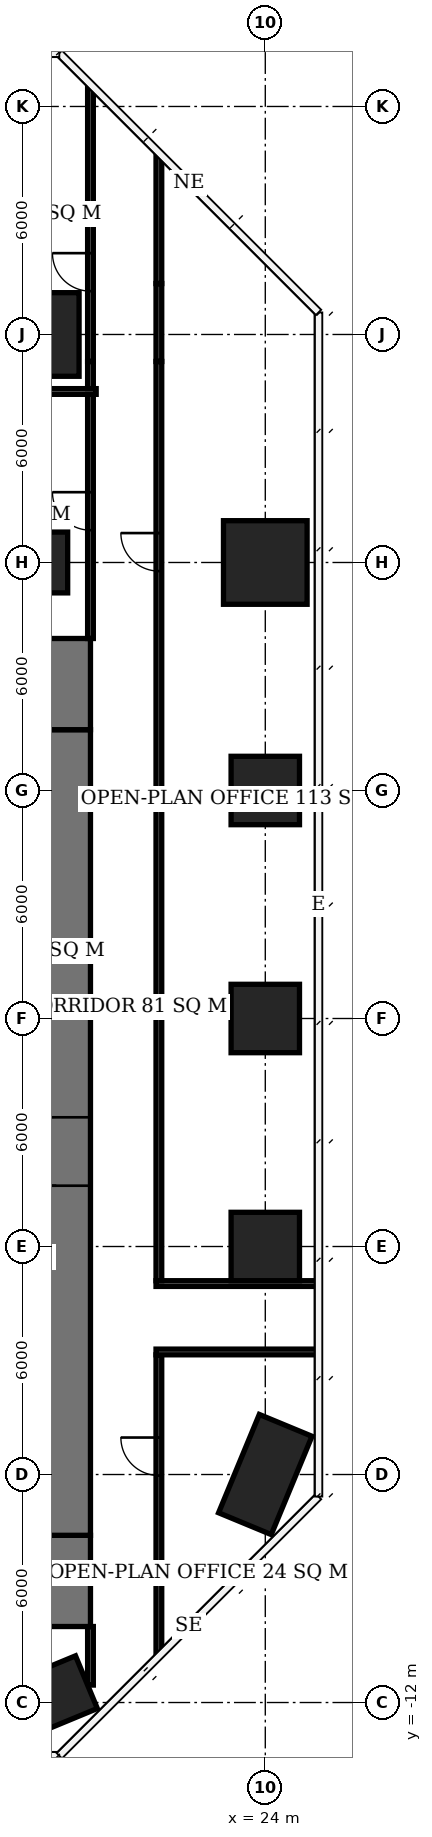
"""IFC4 building model, lengths in metres.
Left out: names, types, materials, properties, quantities, classifications, styles, units other than length and angle.
Written with IfcOpenShell. Run it as: python <this file> out.ifc"""

import sys

from ifc_helpers import new_model, si_unit, direction, frame, frame_2d, origin, origin_2d, place, context, subcontext, project, spatial, rectangle, extrude, element, fill, save


model = new_model("IFC4")
c1 = context("Model", 3, precision=1e-05, world=origin(), true_north=direction((0.0, 1.0)))
c2 = subcontext(c1, "Body", "Model", "MODEL_VIEW")
j1 = project(units=[si_unit("LENGTHUNIT", "METRE"), si_unit("PLANEANGLEUNIT", "RADIAN")], contexts=[c1])
p1 = place(None, origin())
s1 = spatial("IfcSite", under=j1, at=p1, CompositionType="ELEMENT")
p2 = place(p1, origin())
s2 = spatial("IfcBuilding", under=s1, at=p2, CompositionType="ELEMENT")
p3 = place(p2, frame((0.0, 0.0, 105.5)))
s3 = spatial("IfcBuildingStorey", under=s2, at=p3, CompositionType="ELEMENT", Elevation=105.5)
p4 = place(p3, frame((18.0, -12.0, 0.0), z_axis=(0.0, 0.0, 1.0), x_axis=(-0.923879532511, -0.382683432365, 0.0)))
e1 = element("IfcColumn", 1, at=p4, inside=s3, PredefinedType="COLUMN", context=c2, shape_type="SweptSolid", body=[
    extrude(rectangle(XDim=2.8, YDim=1.5, at=origin_2d()), origin(), (0.0, 0.0, 1.0), 3.9),
])
p5 = place(p3, frame((18.0, 18.0, 0.0), z_axis=(0.0, 0.0, 1.0), x_axis=(1.0, 0.0, 0.0)))
e2 = element("IfcColumn", 2, at=p5, inside=s3, PredefinedType="COLUMN", context=c2, shape_type="SweptSolid", body=[
    extrude(rectangle(XDim=1.6, YDim=1.6, at=origin_2d()), origin(), (0.0, 0.0, 1.0), 3.9),
])
p6 = place(p3, frame((18.0, 24.0, 0.0), z_axis=(0.0, 0.0, 1.0), x_axis=(1.0, 0.0, 0.0)))
e3 = element("IfcColumn", 3, at=p6, inside=s3, PredefinedType="COLUMN", context=c2, shape_type="SweptSolid", body=[
    extrude(rectangle(XDim=2.2, YDim=2.2, at=origin_2d()), origin(), (0.0, 0.0, 1.0), 3.9),
])
p7 = place(p3, frame((24.0, -6.0, 0.0), z_axis=(0.0, 0.0, 1.0), x_axis=(-0.382683432365, -0.923879532511, 0.0)))
e4 = element("IfcColumn", 4, at=p7, inside=s3, PredefinedType="COLUMN", context=c2, shape_type="SweptSolid", body=[
    extrude(rectangle(XDim=2.8, YDim=1.5, at=origin_2d()), origin(), (0.0, 0.0, 1.0), 3.9),
])
for number, where, z_axis, x_axis in (
    (5, (24.0, 0.0, 0.0), (0.0, 0.0, 1.0), (1.0, 0.0, 0.0)),
    (6, (24.0, 6.0, 0.0), (0.0, 0.0, 1.0), (1.0, 0.0, 0.0)),
    (7, (24.0, 12.0, 0.0), (0.0, 0.0, 1.0), (1.0, 0.0, 0.0)),
):
    element("IfcColumn", number, at=place(p3, frame(where, z_axis=z_axis, x_axis=x_axis)), inside=s3, PredefinedType="COLUMN", context=c2, shape_type="SweptSolid", body=[
        extrude(rectangle(XDim=1.8, YDim=1.8, at=origin_2d()), origin(), (0.0, 0.0, 1.0), 3.9),
    ])
p8 = place(p3, frame((24.0, 18.0, 0.0), z_axis=(0.0, 0.0, 1.0), x_axis=(1.0, 0.0, 0.0)))
e8 = element("IfcColumn", 8, at=p8, inside=s3, PredefinedType="COLUMN", context=c2, shape_type="SweptSolid", body=[
    extrude(rectangle(XDim=2.2, YDim=2.2, at=origin_2d()), origin(), (0.0, 0.0, 1.0), 3.9),
])
p9 = place(p3, frame((18.5, -7.6, 0.0), z_axis=(0.0, 0.0, 1.0), x_axis=(0.0, 1.0, 0.0)))
e9 = element("IfcWall", 9, at=p9, inside=s3, PredefinedType="SHEAR", context=c2, shape_type="SweptSolid", body=[
    extrude(rectangle(XDim=21.2, YDim=1.8, at=frame_2d((10.6, 0.0))), origin(), (0.0, 0.0, 1.0), 3.9),
])
p10 = place(p9, frame((9.2, 0.0, 0.0)))
e10 = element("IfcOpeningElement", 10, at=p10, cuts=e9, PredefinedType="OPENING", context=c2, shape_type="SweptSolid", body=[
    extrude(rectangle(XDim=1.8, YDim=2.4, at=frame_2d((0.9, 1.2))), frame((0.0, 0.91, 0.0), z_axis=(0.0, -1.0, 0.0), x_axis=(1.0, 0.0, 0.0)), (0.0, 0.0, 1.0), 1.82),
])
for number, where, z_axis, x_axis in (
    (11, (18.5, -10.0, 0.0), (0.0, 0.0, 1.0), (0.0, 1.0, 0.0)),
    (12, (18.5, 13.6, 0.0), (0.0, 0.0, 1.0), (0.0, 1.0, 0.0)),
):
    element("IfcWall", number, at=place(p3, frame(where, z_axis=z_axis, x_axis=x_axis)), inside=s3, PredefinedType="SHEAR", context=c2, shape_type="SweptSolid", body=[
        extrude(rectangle(XDim=2.4, YDim=1.8, at=frame_2d((1.2, 0.0))), origin(), (0.0, 0.0, 1.0), 3.9),
    ])
p11 = place(p3, frame((10.575, 22.5, 0.0), z_axis=(0.0, 0.0, 1.0), x_axis=(1.0, 0.0, 0.0)))
e13 = element("IfcWall", 13, at=p11, inside=s3, PredefinedType="PARTITIONING", context=c2, shape_type="SweptSolid", body=[
    extrude(rectangle(XDim=8.975, YDim=0.15, at=frame_2d((4.488, 0.0))), origin(), (0.0, 0.0, 1.0), 3.65),
])
p12 = place(p3, frame((19.4, -11.541, 0.0), z_axis=(0.0, 0.0, 1.0), x_axis=(0.0, 1.0, 0.0)))
e14 = element("IfcWall", 14, at=p12, inside=s3, PredefinedType="PARTITIONING", context=c2, shape_type="SweptSolid", body=[
    extrude(rectangle(XDim=1.541, YDim=0.15, at=frame_2d((0.77, 0.0))), origin(), (0.0, 0.0, 1.0), 3.65),
])
p13 = place(p3, frame((19.4, 16.0, 0.0), z_axis=(0.0, 0.0, 1.0), x_axis=(0.0, 1.0, 0.0)))
e15 = element("IfcWall", 15, at=p13, inside=s3, PredefinedType="PARTITIONING", context=c2, shape_type="SweptSolid", body=[
    extrude(rectangle(XDim=6.425, YDim=0.15, at=frame_2d((3.212, 0.0))), origin(), (0.0, 0.0, 1.0), 3.65),
])
p14 = place(p13, frame((2.85, 0.0, 0.0)))
e16 = element("IfcOpeningElement", 16, at=p14, cuts=e15, PredefinedType="OPENING", context=c2, shape_type="SweptSolid", body=[
    extrude(rectangle(XDim=1.0, YDim=2.1, at=frame_2d((0.5, 1.05))), frame((0.0, 0.085, 0.0), z_axis=(0.0, -1.0, 0.0), x_axis=(1.0, 0.0, 0.0)), (0.0, 0.0, 1.0), 0.17),
])
p15 = place(p3, frame((19.4, 22.575, 0.0), z_axis=(0.0, 0.0, 1.0), x_axis=(0.0, 1.0, 0.0)))
e17 = element("IfcWall", 17, at=p15, inside=s3, PredefinedType="PARTITIONING", context=c2, shape_type="SweptSolid", body=[
    extrude(rectangle(XDim=0.715, YDim=0.15, at=frame_2d((0.357, 0.0))), origin(), (0.0, 0.0, 1.0), 3.65),
])
p16 = place(p3, frame((19.4, 23.29, 0.0), z_axis=(0.0, 0.0, 1.0), x_axis=(0.0, 1.0, 0.0)))
e18 = element("IfcWall", 18, at=p16, inside=s3, PredefinedType="PARTITIONING", context=c2, shape_type="SweptSolid", body=[
    extrude(rectangle(XDim=3.85, YDim=0.15, at=frame_2d((1.925, 0.0))), origin(), (0.0, 0.0, 1.0), 2.65),
])
p17 = place(p16, frame((1.85, 0.0, 0.0)))
e19 = element("IfcOpeningElement", 19, at=p17, cuts=e18, PredefinedType="OPENING", context=c2, shape_type="SweptSolid", body=[
    extrude(rectangle(XDim=1.0, YDim=2.1, at=frame_2d((0.5, 1.05))), frame((0.0, 0.085, 0.0), z_axis=(0.0, -1.0, 0.0), x_axis=(1.0, 0.0, 0.0)), (0.0, 0.0, 1.0), 0.17),
])
p18 = place(p3, frame((19.4, 27.14, 0.0), z_axis=(0.0, 0.0, 1.0), x_axis=(0.0, 1.0, 0.0)))
e20 = element("IfcWall", 20, at=p18, inside=s3, PredefinedType="PARTITIONING", context=c2, shape_type="SweptSolid", body=[
    extrude(rectangle(XDim=3.349, YDim=0.15, at=frame_2d((1.675, 0.0))), origin(), (0.0, 0.0, 1.0), 3.65),
])
p19 = place(p3, frame((21.2, -10.689, 0.0), z_axis=(0.0, 0.0, 1.0), x_axis=(0.0, 1.0, 0.0)))
e21 = element("IfcWall", 21, at=p19, inside=s3, PredefinedType="PARTITIONING", context=c2, shape_type="SweptSolid", body=[
    extrude(rectangle(XDim=7.839, YDim=0.15, at=frame_2d((3.919, 0.0))), origin(), (0.0, 0.0, 1.0), 3.65),
])
p20 = place(p19, frame((4.662, 0.0, 0.0)))
e22 = element("IfcOpeningElement", 22, at=p20, cuts=e21, PredefinedType="OPENING", context=c2, shape_type="SweptSolid", body=[
    extrude(rectangle(XDim=1.0, YDim=2.1, at=frame_2d((0.5, 1.05))), frame((0.0, 0.085, 0.0), z_axis=(0.0, -1.0, 0.0), x_axis=(1.0, 0.0, 0.0)), (0.0, 0.0, 1.0), 0.17),
])
p21 = place(p3, frame((21.125, -2.775, 0.0), z_axis=(0.0, 0.0, 1.0), x_axis=(1.0, 0.0, 0.0)))
e23 = element("IfcWall", 23, at=p21, inside=s3, PredefinedType="PARTITIONING", context=c2, shape_type="SweptSolid", body=[
    extrude(rectangle(XDim=4.275, YDim=0.15, at=frame_2d((2.137, 0.0))), origin(), (0.0, 0.0, 1.0), 3.65),
])
p22 = place(p3, frame((21.2, -0.9, 0.0), z_axis=(0.0, 0.0, 1.0), x_axis=(0.0, 1.0, 0.0)))
e24 = element("IfcWall", 24, at=p22, inside=s3, PredefinedType="PARTITIONING", context=c2, shape_type="SweptSolid", body=[
    extrude(rectangle(XDim=24.19, YDim=0.15, at=frame_2d((12.095, 0.0))), origin(), (0.0, 0.0, 1.0), 3.65),
])
p23 = place(p22, frame((18.674, 0.0, 0.0)))
e25 = element("IfcOpeningElement", 25, at=p23, cuts=e24, PredefinedType="OPENING", context=c2, shape_type="SweptSolid", body=[
    extrude(rectangle(XDim=1.0, YDim=2.1, at=frame_2d((0.5, 1.05))), frame((0.0, 0.085, 0.0), z_axis=(0.0, -1.0, 0.0), x_axis=(1.0, 0.0, 0.0)), (0.0, 0.0, 1.0), 0.17),
])
p24 = place(p3, frame((21.2, 23.29, 0.0), z_axis=(0.0, 0.0, 1.0), x_axis=(0.0, 1.0, 0.0)))
e26 = element("IfcWall", 26, at=p24, inside=s3, PredefinedType="PARTITIONING", context=c2, shape_type="SweptSolid", body=[
    extrude(rectangle(XDim=2.05, YDim=0.15, at=frame_2d((1.025, 0.0))), origin(), (0.0, 0.0, 1.0), 2.65),
])
p25 = place(p3, frame((21.2, 25.34, 0.0), z_axis=(0.0, 0.0, 1.0), x_axis=(0.0, 1.0, 0.0)))
e27 = element("IfcWall", 27, at=p25, inside=s3, PredefinedType="PARTITIONING", context=c2, shape_type="SweptSolid", body=[
    extrude(rectangle(XDim=3.349, YDim=0.15, at=frame_2d((1.674, 0.0))), origin(), (0.0, 0.0, 1.0), 3.65),
])
p26 = place(p3, frame((21.125, -0.975, 0.0), z_axis=(0.0, 0.0, 1.0), x_axis=(1.0, 0.0, 0.0)))
e28 = element("IfcWall", 28, at=p26, inside=s3, PredefinedType="PARTITIONING", context=c2, shape_type="SweptSolid", body=[
    extrude(rectangle(XDim=4.275, YDim=0.15, at=frame_2d((2.137, 0.0))), origin(), (0.0, 0.0, 1.0), 3.65),
])
p27 = place(p10, origin())
e29 = element("IfcDoor", 29, at=p27, inside=s3, OperationType="DOUBLE_DOOR_SINGLE_SWING", PredefinedType="DOOR", context=c2, shape_type="SweptSolid", body=[
    extrude(rectangle(XDim=1.8, YDim=2.4, at=frame_2d((0.9, 1.2))), frame((0.0, 0.025, 0.0), z_axis=(0.0, -1.0, 0.0), x_axis=(1.0, 0.0, 0.0)), (0.0, 0.0, 1.0), 0.05),
])
fill(e10, e29)
p28 = place(p20, origin())
e30 = element("IfcDoor", 30, at=p28, inside=s3, OperationType="SINGLE_SWING_RIGHT", PredefinedType="DOOR", context=c2, shape_type="SweptSolid", body=[
    extrude(rectangle(XDim=1.0, YDim=2.1, at=frame_2d((0.5, 1.05))), frame((0.0, 0.025, 0.0), z_axis=(0.0, -1.0, 0.0), x_axis=(1.0, 0.0, 0.0)), (0.0, 0.0, 1.0), 0.05),
])
fill(e22, e30)
p29 = place(p23, origin())
e31 = element("IfcDoor", 31, at=p29, inside=s3, OperationType="SINGLE_SWING_RIGHT", PredefinedType="DOOR", context=c2, shape_type="SweptSolid", body=[
    extrude(rectangle(XDim=1.0, YDim=2.1, at=frame_2d((0.5, 1.05))), frame((0.0, 0.025, 0.0), z_axis=(0.0, -1.0, 0.0), x_axis=(1.0, 0.0, 0.0)), (0.0, 0.0, 1.0), 0.05),
])
fill(e25, e31)
p30 = place(p14, origin())
e32 = element("IfcDoor", 32, at=p30, inside=s3, OperationType="SINGLE_SWING_RIGHT", PredefinedType="DOOR", context=c2, shape_type="SweptSolid", body=[
    extrude(rectangle(XDim=1.0, YDim=2.1, at=frame_2d((0.5, 1.05))), frame((0.0, 0.025, 0.0), z_axis=(0.0, -1.0, 0.0), x_axis=(1.0, 0.0, 0.0)), (0.0, 0.0, 1.0), 0.05),
])
fill(e16, e32)
p31 = place(p17, origin())
e33 = element("IfcDoor", 33, at=p31, inside=s3, OperationType="SINGLE_SWING_RIGHT", PredefinedType="DOOR", context=c2, shape_type="SweptSolid", body=[
    extrude(rectangle(XDim=1.0, YDim=2.1, at=frame_2d((0.5, 1.05))), frame((0.0, 0.025, 0.0), z_axis=(0.0, -1.0, 0.0), x_axis=(1.0, 0.0, 0.0)), (0.0, 0.0, 1.0), 0.05),
])
fill(e19, e33)
save(model, sys.argv[1])
